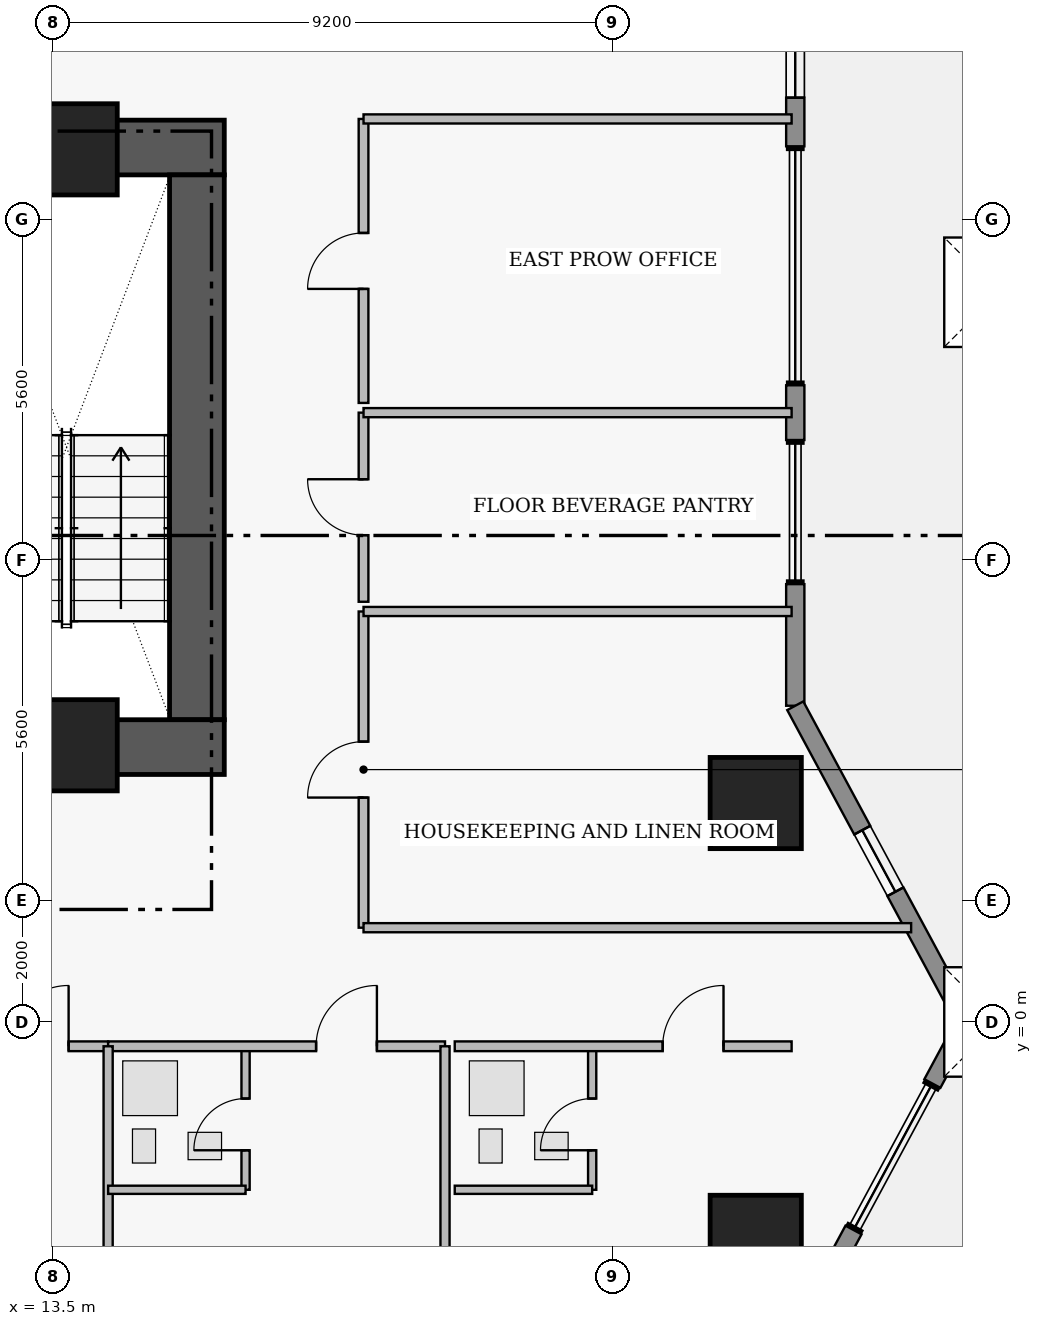
"""IFC4 building model, lengths in metres.
Left out: names, types, materials, properties, quantities, classifications, styles, units other than length and angle.
Written with IfcOpenShell. Run it as: python <this file> out.ifc"""

import sys

from ifc_helpers import new_model, si_unit, direction, frame, frame_2d, origin, origin_2d, place, context, subcontext, project, spatial, rectangle, extrude, element, fill, save


model = new_model("IFC4")
c1 = context("Model", 3, precision=1e-05, world=origin(), true_north=direction((0.0, 1.0)))
c2 = subcontext(c1, "Body", "Model", "MODEL_VIEW")
j1 = project(units=[si_unit("LENGTHUNIT", "METRE"), si_unit("PLANEANGLEUNIT", "RADIAN")], contexts=[c1])
p1 = place(None, origin())
s1 = spatial("IfcSite", under=j1, at=p1, CompositionType="ELEMENT")
p2 = place(p1, origin())
s2 = spatial("IfcBuilding", under=s1, at=p2, CompositionType="ELEMENT")
p3 = place(p2, frame((0.0, 0.0, 27.6)))
s3 = spatial("IfcBuildingStorey", under=s2, at=p3, CompositionType="ELEMENT", Elevation=27.6)
p4 = place(p3, frame((11.6, 14.38, 0.0), z_axis=(0.0, 0.0, 1.0), x_axis=(1.0, 0.0, 0.0)))
e1 = element("IfcWall", 1, at=p4, inside=s3, PredefinedType="SHEAR", context=c2, shape_type="SweptSolid", body=[
    extrude(rectangle(XDim=4.71, YDim=0.9, at=frame_2d((2.355, 0.0))), origin(), (0.0, 0.0, 1.0), 3.46),
])
p5 = place(p3, frame((15.86, 4.97, 0.0), z_axis=(0.0, 0.0, 1.0), x_axis=(0.0, 1.0, 0.0)))
e2 = element("IfcWall", 2, at=p5, inside=s3, PredefinedType="SHEAR", context=c2, shape_type="SweptSolid", body=[
    extrude(rectangle(XDim=8.96, YDim=0.9, at=frame_2d((4.48, 0.0))), origin(), (0.0, 0.0, 1.0), 3.46),
])
p6 = place(p3, frame((11.6, 4.52, 0.0), z_axis=(0.0, 0.0, 1.0), x_axis=(1.0, 0.0, 0.0)))
e3 = element("IfcWall", 3, at=p6, inside=s3, PredefinedType="SHEAR", context=c2, shape_type="SweptSolid", body=[
    extrude(rectangle(XDim=4.71, YDim=0.9, at=frame_2d((2.355, 0.0))), origin(), (0.0, 0.0, 1.0), 3.46),
])
for number, where, z_axis, x_axis in (
    (4, (13.8, 14.35, 0.0), (0.0, 0.0, 1.0), (1.0, 0.0, 0.0)),
    (5, (13.8, 4.55, 0.0), (0.0, 0.0, 1.0), (1.0, 0.0, 0.0)),
    (6, (25.05, -3.6, 0.0), (0.0, 0.0, 1.0), (1.0, 0.0, 0.0)),
    (7, (25.05, 3.6, 0.0), (0.0, 0.0, 1.0), (1.0, 0.0, 0.0)),
):
    element("IfcColumn", number, at=place(p3, frame(where, z_axis=z_axis, x_axis=x_axis)), inside=s3, PredefinedType="COLUMN", context=c2, shape_type="SweptSolid", body=[
        extrude(rectangle(XDim=1.5, YDim=1.5, at=origin_2d()), origin(), (0.0, 0.0, 1.0), 3.65),
    ])
p7 = place(p3, frame((25.7, 19.5, 0.0), z_axis=(0.0, 0.0, 1.0), x_axis=(0.0, -1.0, 0.0)))
e8 = element("IfcWall", 8, at=p7, inside=s3, PredefinedType="STANDARD", context=c2, shape_type="SweptSolid", body=[
    extrude(rectangle(XDim=5.1, YDim=0.3, at=frame_2d((2.55, 0.0))), origin(), (0.0, 0.0, 1.0), 3.43),
])
p8 = place(p7, frame((0.66, 0.0, 0.85)))
e9 = element("IfcOpeningElement", 9, at=p8, cuts=e8, PredefinedType="OPENING", context=c2, shape_type="SweptSolid", body=[
    extrude(rectangle(XDim=1.6, YDim=1.8, at=frame_2d((0.8, 0.9))), frame((0.0, 0.16, 0.0), z_axis=(0.0, -1.0, 0.0), x_axis=(1.0, 0.0, 0.0)), (0.0, 0.0, 1.0), 0.32),
])
p9 = place(p7, frame((3.15, 0.0, 0.95)))
e10 = element("IfcOpeningElement", 10, at=p9, cuts=e8, PredefinedType="OPENING", context=c2, shape_type="SweptSolid", body=[
    extrude(rectangle(XDim=1.15, YDim=1.55, at=frame_2d((0.575, 0.775))), frame((0.0, 0.16, 0.0), z_axis=(0.0, -1.0, 0.0), x_axis=(1.0, 0.0, 0.0)), (0.0, 0.0, 1.0), 0.32),
])
p10 = place(p3, frame((25.7, 10.47, 0.0), z_axis=(0.0, 0.0, 1.0), x_axis=(0.0, -1.0, 0.0)))
e11 = element("IfcWall", 11, at=p10, inside=s3, PredefinedType="STANDARD", context=c2, shape_type="SweptSolid", body=[
    extrude(rectangle(XDim=0.9, YDim=0.3, at=frame_2d((0.45, 0.0))), origin(), (0.0, 0.0, 1.0), 3.43),
])
p11 = place(p3, frame((25.7, 7.2, 0.0), z_axis=(0.0, 0.0, 1.0), x_axis=(0.0, -1.0, 0.0)))
e12 = element("IfcWall", 12, at=p11, inside=s3, PredefinedType="STANDARD", context=c2, shape_type="SweptSolid", body=[
    extrude(rectangle(XDim=2.0, YDim=0.3, at=frame_2d((1.0, 0.0))), origin(), (0.0, 0.0, 1.0), 3.43),
])
p12 = place(p3, frame((25.7, 5.2, 0.0), z_axis=(0.0, 0.0, 1.0), x_axis=(0.474109683532, -0.880465790352, 0.0)))
e13 = element("IfcWall", 13, at=p12, inside=s3, PredefinedType="STANDARD", context=c2, shape_type="SweptSolid", body=[
    extrude(rectangle(XDim=5.906, YDim=0.3, at=frame_2d((2.953, 0.0))), origin(), (0.0, 0.0, 1.0), 3.43),
])
p13 = place(p12, frame((2.324, 0.0, 0.95)))
e14 = element("IfcOpeningElement", 14, at=p13, cuts=e13, PredefinedType="OPENING", context=c2, shape_type="SweptSolid", body=[
    extrude(rectangle(XDim=1.15, YDim=1.55, at=frame_2d((0.575, 0.775))), frame((0.0, 0.16, 0.0), z_axis=(0.0, -1.0, 0.0), x_axis=(1.0, 0.0, 0.0)), (0.0, 0.0, 1.0), 0.32),
])
p14 = place(p3, frame((28.5, 0.0, 0.0), z_axis=(0.0, 0.0, 1.0), x_axis=(-0.474099823035, -0.880471099922, 0.0)))
e15 = element("IfcWall", 15, at=p14, inside=s3, PredefinedType="STANDARD", context=c2, shape_type="SweptSolid", body=[
    extrude(rectangle(XDim=1.15, YDim=0.3, at=frame_2d((0.575, 0.0))), origin(), (0.0, 0.0, 1.0), 3.43),
])
p15 = place(p3, frame((26.658, -3.421, 0.0), z_axis=(0.0, 0.0, 1.0), x_axis=(-0.474121438562, -0.88045946045, 0.0)))
e16 = element("IfcWall", 16, at=p15, inside=s3, PredefinedType="STANDARD", context=c2, shape_type="SweptSolid", body=[
    extrude(rectangle(XDim=2.021, YDim=0.3, at=frame_2d((1.01, 0.0))), origin(), (0.0, 0.0, 1.0), 3.43),
])
p16 = place(p3, frame((9.8, -0.4, 0.0), z_axis=(0.0, 0.0, 1.0), x_axis=(1.0, 0.0, 0.0)))
e17 = element("IfcWall", 17, at=p16, inside=s3, PredefinedType="PARTITIONING", context=c2, shape_type="SweptSolid", body=[
    extrude(rectangle(XDim=4.6, YDim=0.16, at=frame_2d((2.3, 0.0))), origin(), (0.0, 0.0, 1.0), 3.43),
])
p17 = place(p16, frame((2.95, 0.0, 0.0)))
e18 = element("IfcOpeningElement", 18, at=p17, cuts=e17, PredefinedType="OPENING", context=c2, shape_type="SweptSolid", body=[
    extrude(rectangle(XDim=1.0, YDim=2.15, at=frame_2d((0.5, 1.075))), frame((0.0, 0.09, 0.0), z_axis=(0.0, -1.0, 0.0), x_axis=(1.0, 0.0, 0.0)), (0.0, 0.0, 1.0), 0.18),
])
p18 = place(p3, frame((16.66, -2.76, 0.0), z_axis=(0.0, 0.0, 1.0), x_axis=(0.0, 1.0, 0.0)))
e19 = element("IfcWall", 19, at=p18, inside=s3, PredefinedType="PLUMBINGWALL", context=c2, shape_type="SweptSolid", body=[
    extrude(rectangle(XDim=2.36, YDim=0.135, at=frame_2d((1.18, 0.0))), origin(), (0.0, 0.0, 1.0), 3.43),
])
p19 = place(p18, frame((0.65, 0.0, 0.0)))
e20 = element("IfcOpeningElement", 20, at=p19, cuts=e19, PredefinedType="OPENING", context=c2, shape_type="SweptSolid", body=[
    extrude(rectangle(XDim=0.85, YDim=2.1, at=frame_2d((0.425, 1.05))), frame((0.0, 0.077, 0.0), z_axis=(0.0, -1.0, 0.0), x_axis=(1.0, 0.0, 0.0)), (0.0, 0.0, 1.0), 0.155),
])
p20 = place(p3, frame((14.4, -0.4, 0.0), z_axis=(0.0, 0.0, 1.0), x_axis=(1.0, 0.0, 0.0)))
e21 = element("IfcWall", 21, at=p20, inside=s3, PredefinedType="PARTITIONING", context=c2, shape_type="SweptSolid", body=[
    extrude(rectangle(XDim=5.54, YDim=0.16, at=frame_2d((2.77, 0.0))), origin(), (0.0, 0.0, 1.0), 3.43),
])
p21 = place(p20, frame((3.42, 0.0, 0.0)))
e22 = element("IfcOpeningElement", 22, at=p21, cuts=e21, PredefinedType="OPENING", context=c2, shape_type="SweptSolid", body=[
    extrude(rectangle(XDim=1.0, YDim=2.15, at=frame_2d((0.5, 1.075))), frame((0.0, 0.09, 0.0), z_axis=(0.0, -1.0, 0.0), x_axis=(1.0, 0.0, 0.0)), (0.0, 0.0, 1.0), 0.18),
])
p22 = place(p3, frame((22.36, -2.76, 0.0), z_axis=(0.0, 0.0, 1.0), x_axis=(0.0, 1.0, 0.0)))
e23 = element("IfcWall", 23, at=p22, inside=s3, PredefinedType="PLUMBINGWALL", context=c2, shape_type="SweptSolid", body=[
    extrude(rectangle(XDim=2.36, YDim=0.135, at=frame_2d((1.18, 0.0))), origin(), (0.0, 0.0, 1.0), 3.43),
])
p23 = place(p22, frame((0.65, 0.0, 0.0)))
e24 = element("IfcOpeningElement", 24, at=p23, cuts=e23, PredefinedType="OPENING", context=c2, shape_type="SweptSolid", body=[
    extrude(rectangle(XDim=0.85, YDim=2.1, at=frame_2d((0.425, 1.05))), frame((0.0, 0.077, 0.0), z_axis=(0.0, -1.0, 0.0), x_axis=(1.0, 0.0, 0.0)), (0.0, 0.0, 1.0), 0.155),
])
p24 = place(p3, frame((20.1, -0.4, 0.0), z_axis=(0.0, 0.0, 1.0), x_axis=(1.0, 0.0, 0.0)))
e25 = element("IfcWall", 25, at=p24, inside=s3, PredefinedType="PARTITIONING", context=c2, shape_type="SweptSolid", body=[
    extrude(rectangle(XDim=5.54, YDim=0.16, at=frame_2d((2.77, 0.0))), origin(), (0.0, 0.0, 1.0), 3.43),
])
p25 = place(p24, frame((3.42, 0.0, 0.0)))
e26 = element("IfcOpeningElement", 26, at=p25, cuts=e25, PredefinedType="OPENING", context=c2, shape_type="SweptSolid", body=[
    extrude(rectangle(XDim=1.0, YDim=2.15, at=frame_2d((0.5, 1.075))), frame((0.0, 0.09, 0.0), z_axis=(0.0, -1.0, 0.0), x_axis=(1.0, 0.0, 0.0)), (0.0, 0.0, 1.0), 0.18),
])
p26 = place(p3, frame((18.6, 1.55, 0.0), z_axis=(0.0, 0.0, 1.0), x_axis=(0.0, 1.0, 0.0)))
e27 = element("IfcWall", 27, at=p26, inside=s3, PredefinedType="PARTITIONING", context=c2, shape_type="SweptSolid", body=[
    extrude(rectangle(XDim=5.2, YDim=0.16, at=frame_2d((2.6, 0.0))), origin(), (0.0, 0.0, 1.0), 3.43),
])
p27 = place(p26, frame((2.14, 0.0, 0.0)))
e28 = element("IfcOpeningElement", 28, at=p27, cuts=e27, PredefinedType="OPENING", context=c2, shape_type="SweptSolid", body=[
    extrude(rectangle(XDim=0.92, YDim=2.12, at=frame_2d((0.46, 1.06))), frame((0.0, 0.09, 0.0), z_axis=(0.0, -1.0, 0.0), x_axis=(1.0, 0.0, 0.0)), (0.0, 0.0, 1.0), 0.18),
])
p28 = place(p3, frame((18.6, 6.91, 0.0), z_axis=(0.0, 0.0, 1.0), x_axis=(0.0, 1.0, 0.0)))
e29 = element("IfcWall", 29, at=p28, inside=s3, PredefinedType="PARTITIONING", context=c2, shape_type="SweptSolid", body=[
    extrude(rectangle(XDim=3.11, YDim=0.16, at=frame_2d((1.555, 0.0))), origin(), (0.0, 0.0, 1.0), 3.43),
])
p29 = place(p28, frame((1.095, 0.0, 0.0)))
e30 = element("IfcOpeningElement", 30, at=p29, cuts=e29, PredefinedType="OPENING", context=c2, shape_type="SweptSolid", body=[
    extrude(rectangle(XDim=0.92, YDim=2.12, at=frame_2d((0.46, 1.06))), frame((0.0, 0.09, 0.0), z_axis=(0.0, -1.0, 0.0), x_axis=(1.0, 0.0, 0.0)), (0.0, 0.0, 1.0), 0.18),
])
p30 = place(p3, frame((18.6, 10.18, 0.0), z_axis=(0.0, 0.0, 1.0), x_axis=(0.0, 1.0, 0.0)))
e31 = element("IfcWall", 31, at=p30, inside=s3, PredefinedType="PARTITIONING", context=c2, shape_type="SweptSolid", body=[
    extrude(rectangle(XDim=4.67, YDim=0.16, at=frame_2d((2.335, 0.0))), origin(), (0.0, 0.0, 1.0), 3.43),
])
p31 = place(p30, frame((1.875, 0.0, 0.0)))
e32 = element("IfcOpeningElement", 32, at=p31, cuts=e31, PredefinedType="OPENING", context=c2, shape_type="SweptSolid", body=[
    extrude(rectangle(XDim=0.92, YDim=2.12, at=frame_2d((0.46, 1.06))), frame((0.0, 0.09, 0.0), z_axis=(0.0, -1.0, 0.0), x_axis=(1.0, 0.0, 0.0)), (0.0, 0.0, 1.0), 0.18),
])
p32 = place(p3, frame((14.4, -23.02, 0.0), z_axis=(0.0, 0.0, 1.0), x_axis=(0.0, 1.0, 0.0)))
e33 = element("IfcWall", 33, at=p32, inside=s3, PredefinedType="PARTITIONING", context=c2, shape_type="SweptSolid", body=[
    extrude(rectangle(XDim=22.62, YDim=0.15, at=frame_2d((11.31, 0.0))), origin(), (0.0, 0.0, 1.0), 3.43),
])
p33 = place(p3, frame((14.4, -2.76, 0.0), z_axis=(0.0, 0.0, 1.0), x_axis=(1.0, 0.0, 0.0)))
e34 = element("IfcWall", 34, at=p33, inside=s3, PredefinedType="PLUMBINGWALL", context=c2, shape_type="SweptSolid", body=[
    extrude(rectangle(XDim=2.26, YDim=0.135, at=frame_2d((1.13, 0.0))), origin(), (0.0, 0.0, 1.0), 3.43),
])
p34 = place(p3, frame((19.94, -23.02, 0.0), z_axis=(0.0, 0.0, 1.0), x_axis=(0.0, 1.0, 0.0)))
e35 = element("IfcWall", 35, at=p34, inside=s3, PredefinedType="PARTITIONING", context=c2, shape_type="SweptSolid", body=[
    extrude(rectangle(XDim=22.62, YDim=0.15, at=frame_2d((11.31, 0.0))), origin(), (0.0, 0.0, 1.0), 3.43),
])
p35 = place(p3, frame((20.1, -2.76, 0.0), z_axis=(0.0, 0.0, 1.0), x_axis=(1.0, 0.0, 0.0)))
e36 = element("IfcWall", 36, at=p35, inside=s3, PredefinedType="PLUMBINGWALL", context=c2, shape_type="SweptSolid", body=[
    extrude(rectangle(XDim=2.26, YDim=0.135, at=frame_2d((1.13, 0.0))), origin(), (0.0, 0.0, 1.0), 3.43),
])
p36 = place(p3, frame((18.6, 1.55, 0.0), z_axis=(0.0, 0.0, 1.0), x_axis=(1.0, 0.0, 0.0)))
e37 = element("IfcWall", 37, at=p36, inside=s3, PredefinedType="PARTITIONING", context=c2, shape_type="SweptSolid", body=[
    extrude(rectangle(XDim=9.005, YDim=0.15, at=frame_2d((4.503, 0.0))), origin(), (0.0, 0.0, 1.0), 3.43),
])
for number, where, z_axis, x_axis in (
    (38, (18.6, 6.75, 0.0), (0.0, 0.0, 1.0), (1.0, 0.0, 0.0)),
    (39, (18.6, 10.02, 0.0), (0.0, 0.0, 1.0), (1.0, 0.0, 0.0)),
    (40, (18.6, 14.85, 0.0), (0.0, 0.0, 1.0), (1.0, 0.0, 0.0)),
):
    element("IfcWall", number, at=place(p3, frame(where, z_axis=z_axis, x_axis=x_axis)), inside=s3, PredefinedType="PARTITIONING", context=c2, shape_type="SweptSolid", body=[
        extrude(rectangle(XDim=7.04, YDim=0.15, at=frame_2d((3.52, 0.0))), origin(), (0.0, 0.0, 1.0), 3.43),
    ])
p37 = place(p3, frame((0.0, 0.0, -0.22)))
p38 = place(p37, frame((29.05, 0.0, 0.0)))
p39 = place(p38, frame((0.0, 0.0, 0.17)))
e41 = element("IfcWindow", 41, at=p39, inside=s3, PartitioningType="SINGLE_PANEL", PredefinedType="SKYLIGHT", context=c2, shape_type="SweptSolid", body=[
    extrude(rectangle(XDim=1.8, YDim=1.8, at=origin_2d()), origin(), (0.0, 0.0, 1.0), 0.05),
])
p40 = place(p37, frame((29.05, 12.0, 0.0)))
p41 = place(p40, frame((0.0, 0.0, 0.17)))
e42 = element("IfcWindow", 42, at=p41, inside=s3, PartitioningType="SINGLE_PANEL", PredefinedType="SKYLIGHT", context=c2, shape_type="SweptSolid", body=[
    extrude(rectangle(XDim=1.8, YDim=1.8, at=origin_2d()), origin(), (0.0, 0.0, 1.0), 0.05),
])
p42 = place(p9, origin())
e43 = element("IfcWindow", 43, at=p42, inside=s3, PartitioningType="SINGLE_PANEL", PredefinedType="WINDOW", context=c2, shape_type="SweptSolid", body=[
    extrude(rectangle(XDim=1.15, YDim=1.55, at=frame_2d((0.575, 0.775))), frame((0.0, 0.03, 0.0), z_axis=(0.0, -1.0, 0.0), x_axis=(1.0, 0.0, 0.0)), (0.0, 0.0, 1.0), 0.06),
])
fill(e10, e43)
p43 = place(p13, origin())
e44 = element("IfcWindow", 44, at=p43, inside=s3, PartitioningType="SINGLE_PANEL", PredefinedType="WINDOW", context=c2, shape_type="SweptSolid", body=[
    extrude(rectangle(XDim=1.15, YDim=1.55, at=frame_2d((0.575, 0.775))), frame((0.0, 0.03, 0.0), z_axis=(0.0, -1.0, 0.0), x_axis=(1.0, 0.0, 0.0)), (0.0, 0.0, 1.0), 0.06),
])
fill(e14, e44)
p44 = place(p17, origin())
e45 = element("IfcDoor", 45, at=p44, inside=s3, OperationType="SINGLE_SWING_RIGHT", PredefinedType="DOOR", context=c2, shape_type="SweptSolid", body=[
    extrude(rectangle(XDim=1.0, YDim=2.15, at=frame_2d((0.5, 1.075))), frame((0.0, 0.025, 0.0), z_axis=(0.0, -1.0, 0.0), x_axis=(1.0, 0.0, 0.0)), (0.0, 0.0, 1.0), 0.05),
])
fill(e18, e45)
p45 = place(p19, origin())
e46 = element("IfcDoor", 46, at=p45, inside=s3, OperationType="SINGLE_SWING_LEFT", PredefinedType="DOOR", context=c2, shape_type="SweptSolid", body=[
    extrude(rectangle(XDim=0.85, YDim=2.1, at=frame_2d((0.425, 1.05))), frame((0.0, 0.025, 0.0), z_axis=(0.0, -1.0, 0.0), x_axis=(1.0, 0.0, 0.0)), (0.0, 0.0, 1.0), 0.05),
])
fill(e20, e46)
p46 = place(p21, origin())
e47 = element("IfcDoor", 47, at=p46, inside=s3, OperationType="SINGLE_SWING_RIGHT", PredefinedType="DOOR", context=c2, shape_type="SweptSolid", body=[
    extrude(rectangle(XDim=1.0, YDim=2.15, at=frame_2d((0.5, 1.075))), frame((0.0, 0.025, 0.0), z_axis=(0.0, -1.0, 0.0), x_axis=(1.0, 0.0, 0.0)), (0.0, 0.0, 1.0), 0.05),
])
fill(e22, e47)
p47 = place(p23, origin())
e48 = element("IfcDoor", 48, at=p47, inside=s3, OperationType="SINGLE_SWING_LEFT", PredefinedType="DOOR", context=c2, shape_type="SweptSolid", body=[
    extrude(rectangle(XDim=0.85, YDim=2.1, at=frame_2d((0.425, 1.05))), frame((0.0, 0.025, 0.0), z_axis=(0.0, -1.0, 0.0), x_axis=(1.0, 0.0, 0.0)), (0.0, 0.0, 1.0), 0.05),
])
fill(e24, e48)
p48 = place(p25, origin())
e49 = element("IfcDoor", 49, at=p48, inside=s3, OperationType="SINGLE_SWING_RIGHT", PredefinedType="DOOR", context=c2, shape_type="SweptSolid", body=[
    extrude(rectangle(XDim=1.0, YDim=2.15, at=frame_2d((0.5, 1.075))), frame((0.0, 0.025, 0.0), z_axis=(0.0, -1.0, 0.0), x_axis=(1.0, 0.0, 0.0)), (0.0, 0.0, 1.0), 0.05),
])
fill(e26, e49)
p49 = place(p27, origin())
e50 = element("IfcDoor", 50, at=p49, inside=s3, OperationType="SINGLE_SWING_LEFT", PredefinedType="DOOR", context=c2, shape_type="SweptSolid", body=[
    extrude(rectangle(XDim=0.92, YDim=2.12, at=frame_2d((0.46, 1.06))), frame((0.0, 0.025, 0.0), z_axis=(0.0, -1.0, 0.0), x_axis=(1.0, 0.0, 0.0)), (0.0, 0.0, 1.0), 0.05),
])
fill(e28, e50)
p50 = place(p29, origin())
e51 = element("IfcDoor", 51, at=p50, inside=s3, OperationType="SINGLE_SWING_RIGHT", PredefinedType="DOOR", context=c2, shape_type="SweptSolid", body=[
    extrude(rectangle(XDim=0.92, YDim=2.12, at=frame_2d((0.46, 1.06))), frame((0.0, 0.025, 0.0), z_axis=(0.0, -1.0, 0.0), x_axis=(1.0, 0.0, 0.0)), (0.0, 0.0, 1.0), 0.05),
])
fill(e30, e51)
p51 = place(p31, origin())
e52 = element("IfcDoor", 52, at=p51, inside=s3, OperationType="SINGLE_SWING_LEFT", PredefinedType="DOOR", context=c2, shape_type="SweptSolid", body=[
    extrude(rectangle(XDim=0.92, YDim=2.12, at=frame_2d((0.46, 1.06))), frame((0.0, 0.025, 0.0), z_axis=(0.0, -1.0, 0.0), x_axis=(1.0, 0.0, 0.0)), (0.0, 0.0, 1.0), 0.05),
])
fill(e32, e52)
save(model, sys.argv[1])
